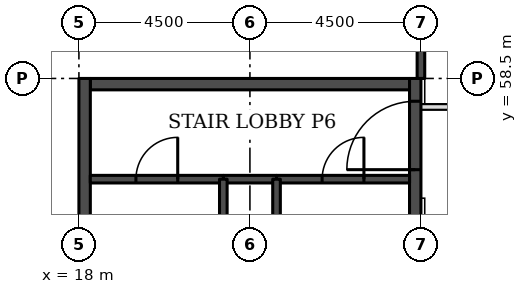
"""IFC4 building model, lengths in metres.
Left out: names, types, materials, properties, quantities, classifications, styles, units other than length and angle.
Written with IfcOpenShell. Run it as: python <this file> out.ifc"""

import sys

from ifc_helpers import new_model, si_unit, direction, frame, frame_2d, origin, place, context, subcontext, project, spatial, rectangle, extrude, element, fill, save


model = new_model("IFC4")
c1 = context("Model", 3, precision=1e-05, world=origin(), true_north=direction((0.0, 1.0)))
c2 = subcontext(c1, "Body", "Model", "MODEL_VIEW")
j1 = project(units=[si_unit("LENGTHUNIT", "METRE"), si_unit("PLANEANGLEUNIT", "RADIAN")], contexts=[c1])
p1 = place(None, origin())
s1 = spatial("IfcSite", under=j1, at=p1, CompositionType="ELEMENT")
p2 = place(p1, origin())
s2 = spatial("IfcBuilding", under=s1, at=p2, CompositionType="ELEMENT")
p3 = place(p2, frame((0.0, 0.0, 62.7)))
s3 = spatial("IfcBuildingStorey", under=s2, at=p3, CompositionType="ELEMENT", Elevation=62.7)
p4 = place(p3, frame((18.3, 58.35, 0.0), z_axis=(0.0, 0.0, 1.0), x_axis=(1.0, 0.0, 0.0)))
e1 = element("IfcWall", 1, at=p4, inside=s3, PredefinedType="SHEAR", context=c2, shape_type="SweptSolid", body=[
    extrude(rectangle(XDim=8.4, YDim=0.3, at=frame_2d((4.2, 0.0))), origin(), (0.0, 0.0, 1.0), 3.3),
])
p5 = place(p3, frame((18.15, 49.5, 0.0), z_axis=(0.0, 0.0, 1.0), x_axis=(0.0, 1.0, 0.0)))
e2 = element("IfcWall", 2, at=p5, inside=s3, PredefinedType="SHEAR", context=c2, shape_type="SweptSolid", body=[
    extrude(rectangle(XDim=9.0, YDim=0.3, at=frame_2d((4.5, 0.0))), origin(), (0.0, 0.0, 1.0), 3.3),
])
p6 = place(p3, frame((26.85, 49.5, 0.0), z_axis=(0.0, 0.0, 1.0), x_axis=(0.0, 1.0, 0.0)))
e3 = element("IfcWall", 3, at=p6, inside=s3, PredefinedType="SHEAR", context=c2, shape_type="SweptSolid", body=[
    extrude(rectangle(XDim=9.0, YDim=0.3, at=frame_2d((4.5, 0.0))), origin(), (0.0, 0.0, 1.0), 3.3),
])
p7 = place(p6, frame((6.6, 0.0, 0.0)))
e4 = element("IfcOpeningElement", 4, at=p7, cuts=e3, PredefinedType="OPENING", context=c2, shape_type="SweptSolid", body=[
    extrude(rectangle(XDim=1.8, YDim=2.1, at=frame_2d((0.9, 1.05))), frame((0.0, 0.16, 0.0), z_axis=(0.0, -1.0, 0.0), x_axis=(1.0, 0.0, 0.0)), (0.0, 0.0, 1.0), 0.32),
])
p8 = place(p3, frame((17.73, 63.826, 0.0), z_axis=(0.0, 0.0, 1.0), x_axis=(-0.707106781187, -0.707106781187, 0.0)))
e5 = element("IfcWall", 5, at=p8, inside=s3, PredefinedType="STANDARD", context=c2, shape_type="SweptSolid", body=[
    extrude(rectangle(XDim=7.151, YDim=0.35, at=frame_2d((3.576, 0.0))), origin(), (0.0, 0.0, 1.0), 3.055),
])
p9 = place(p8, frame((1.926, 0.0, 0.8)))
e6 = element("IfcOpeningElement", 6, at=p9, cuts=e5, PredefinedType="OPENING", context=c2, shape_type="SweptSolid", body=[
    extrude(rectangle(XDim=3.3, YDim=1.5, at=frame_2d((1.65, 0.75))), frame((0.0, 0.185, 0.0), z_axis=(0.0, -1.0, 0.0), x_axis=(1.0, 0.0, 0.0)), (0.0, 0.0, 1.0), 0.37),
])
p10 = place(p3, frame((27.0, 58.5, 0.0), z_axis=(0.0, 0.0, 1.0), x_axis=(0.0, 1.0, 0.0)))
e7 = element("IfcWall", 7, at=p10, inside=s3, PredefinedType="SOLIDWALL", context=c2, shape_type="SweptSolid", body=[
    extrude(rectangle(XDim=3.9, YDim=0.2, at=frame_2d((1.95, 0.0))), origin(), (0.0, 0.0, 1.0), 3.08),
])
p11 = place(p3, frame((27.0, 57.75, 0.0), z_axis=(0.0, 0.0, 1.0), x_axis=(1.0, 0.0, 0.0)))
e8 = element("IfcWall", 8, at=p11, inside=s3, PredefinedType="PARTITIONING", context=c2, shape_type="SweptSolid", body=[
    extrude(rectangle(XDim=2.48, YDim=0.15, at=frame_2d((1.24, 0.0))), origin(), (0.0, 0.0, 1.0), 3.08),
])
p12 = place(p11, frame((0.875, 0.0, 0.0)))
e9 = element("IfcOpeningElement", 9, at=p12, cuts=e8, PredefinedType="OPENING", context=c2, shape_type="SweptSolid", body=[
    extrude(rectangle(XDim=1.0, YDim=2.1, at=frame_2d((0.5, 1.05))), frame((0.0, 0.085, 0.0), z_axis=(0.0, -1.0, 0.0), x_axis=(1.0, 0.0, 0.0)), (0.0, 0.0, 1.0), 0.17),
])
p13 = place(p3, frame((21.8, 55.85, 0.0), z_axis=(0.0, 0.0, 1.0), x_axis=(1.0, 0.0, 0.0)))
e10 = element("IfcWall", 10, at=p13, inside=s3, PredefinedType="SOLIDWALL", context=c2, shape_type="SweptSolid", body=[
    extrude(rectangle(XDim=1.4, YDim=0.2, at=frame_2d((0.7, 0.0))), origin(), (0.0, 0.0, 1.0), 3.08),
])
p14 = place(p3, frame((18.3, 55.85, 0.0), z_axis=(0.0, 0.0, 1.0), x_axis=(1.0, 0.0, 0.0)))
e11 = element("IfcWall", 11, at=p14, inside=s3, PredefinedType="SOLIDWALL", context=c2, shape_type="SweptSolid", body=[
    extrude(rectangle(XDim=3.5, YDim=0.2, at=frame_2d((1.75, 0.0))), origin(), (0.0, 0.0, 1.0), 3.08),
])
p15 = place(p14, frame((1.2, 0.0, 0.0)))
e12 = element("IfcOpeningElement", 12, at=p15, cuts=e11, PredefinedType="OPENING", context=c2, shape_type="SweptSolid", body=[
    extrude(rectangle(XDim=1.1, YDim=2.1, at=frame_2d((0.55, 1.05))), frame((0.0, 0.11, 0.0), z_axis=(0.0, -1.0, 0.0), x_axis=(1.0, 0.0, 0.0)), (0.0, 0.0, 1.0), 0.22),
])
p16 = place(p3, frame((23.2, 55.85, 0.0), z_axis=(0.0, 0.0, 1.0), x_axis=(1.0, 0.0, 0.0)))
e13 = element("IfcWall", 13, at=p16, inside=s3, PredefinedType="SOLIDWALL", context=c2, shape_type="SweptSolid", body=[
    extrude(rectangle(XDim=3.5, YDim=0.2, at=frame_2d((1.75, 0.0))), origin(), (0.0, 0.0, 1.0), 3.08),
])
p17 = place(p16, frame((1.2, 0.0, 0.0)))
e14 = element("IfcOpeningElement", 14, at=p17, cuts=e13, PredefinedType="OPENING", context=c2, shape_type="SweptSolid", body=[
    extrude(rectangle(XDim=1.1, YDim=2.1, at=frame_2d((0.55, 1.05))), frame((0.0, 0.11, 0.0), z_axis=(0.0, -1.0, 0.0), x_axis=(1.0, 0.0, 0.0)), (0.0, 0.0, 1.0), 0.22),
])
for number, where, z_axis, x_axis in (
    (15, (21.8, 49.8, 0.0), (0.0, 0.0, 1.0), (0.0, 1.0, 0.0)),
    (16, (23.2, 49.8, 0.0), (0.0, 0.0, 1.0), (0.0, 1.0, 0.0)),
):
    element("IfcWall", number, at=place(p3, frame(where, z_axis=z_axis, x_axis=x_axis)), inside=s3, PredefinedType="SOLIDWALL", context=c2, shape_type="SweptSolid", body=[
        extrude(rectangle(XDim=6.05, YDim=0.2, at=frame_2d((3.025, 0.0))), origin(), (0.0, 0.0, 1.0), 3.08),
    ])
p18 = place(p15, origin())
e17 = element("IfcDoor", 17, at=p18, inside=s3, OperationType="SINGLE_SWING_RIGHT", PredefinedType="DOOR", context=c2, shape_type="SweptSolid", body=[
    extrude(rectangle(XDim=1.1, YDim=2.1, at=frame_2d((0.55, 1.05))), frame((0.0, 0.025, 0.0), z_axis=(0.0, -1.0, 0.0), x_axis=(1.0, 0.0, 0.0)), (0.0, 0.0, 1.0), 0.05),
])
fill(e12, e17)
p19 = place(p17, origin())
e18 = element("IfcDoor", 18, at=p19, inside=s3, OperationType="SINGLE_SWING_RIGHT", PredefinedType="DOOR", context=c2, shape_type="SweptSolid", body=[
    extrude(rectangle(XDim=1.1, YDim=2.1, at=frame_2d((0.55, 1.05))), frame((0.0, 0.025, 0.0), z_axis=(0.0, -1.0, 0.0), x_axis=(1.0, 0.0, 0.0)), (0.0, 0.0, 1.0), 0.05),
])
fill(e14, e18)
p20 = place(p7, origin())
e19 = element("IfcDoor", 19, at=p20, inside=s3, OperationType="SINGLE_SWING_LEFT", PredefinedType="DOOR", context=c2, shape_type="SweptSolid", body=[
    extrude(rectangle(XDim=1.8, YDim=2.1, at=frame_2d((0.9, 1.05))), frame((0.0, 0.025, 0.0), z_axis=(0.0, -1.0, 0.0), x_axis=(1.0, 0.0, 0.0)), (0.0, 0.0, 1.0), 0.05),
])
fill(e4, e19)
save(model, sys.argv[1])
